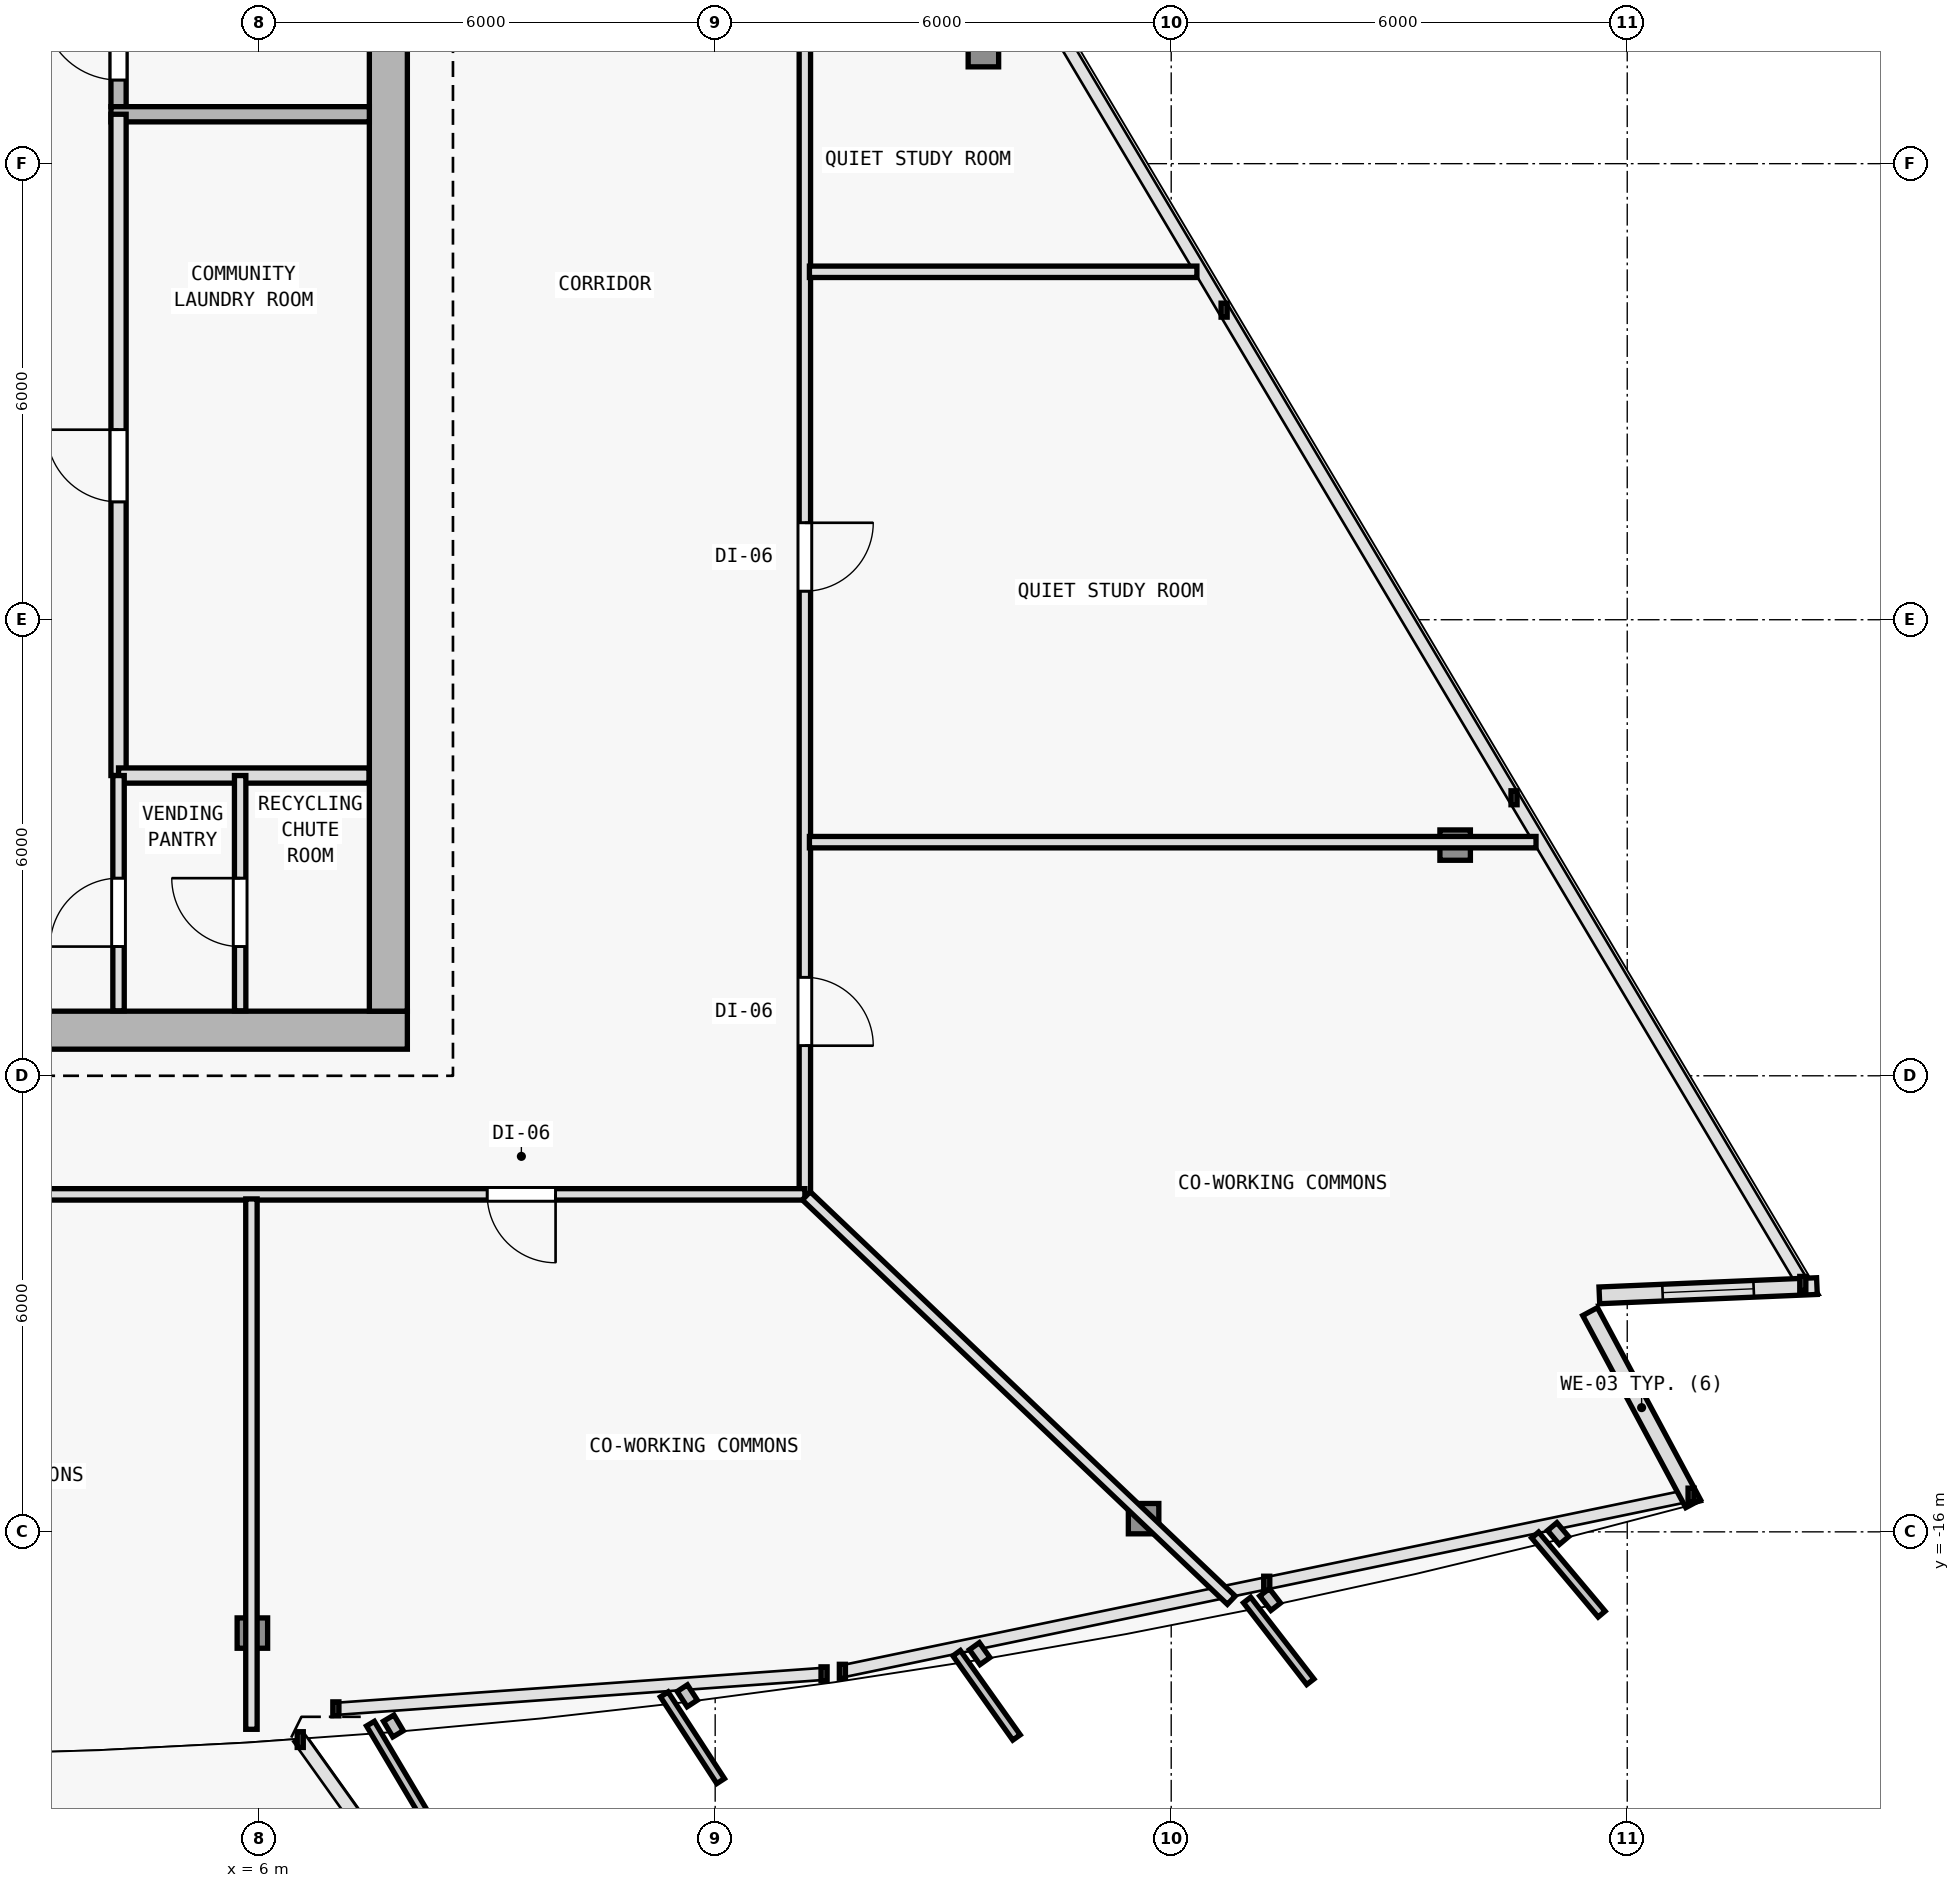
"""IFC4 building model, lengths in metres.
Left out: names, types, materials, properties, quantities, classifications, styles, units other than length and angle.
Written with IfcOpenShell. Run it as: python <this file> out.ifc"""

import sys

from ifc_helpers import new_model, si_unit, direction, frame, frame_2d, origin, origin_2d, place, context, subcontext, project, spatial, rectangle, i_section, extrude, element, fill, save


model = new_model("IFC4")
c1 = context("Model", 3, precision=1e-05, world=origin(), true_north=direction((0.0, 1.0)))
c2 = subcontext(c1, "Body", "Model", "MODEL_VIEW")
j1 = project(units=[si_unit("LENGTHUNIT", "METRE"), si_unit("PLANEANGLEUNIT", "RADIAN")], contexts=[c1])
p1 = place(None, origin())
s1 = spatial("IfcSite", under=j1, at=p1, CompositionType="ELEMENT")
p2 = place(p1, origin())
s2 = spatial("IfcBuilding", under=s1, at=p2, CompositionType="ELEMENT")
p3 = place(p2, frame((0.0, 0.0, 163.8)))
s3 = spatial("IfcBuildingStorey", under=s2, at=p3, CompositionType="ELEMENT", Elevation=163.8)
for number, where, z_axis, x_axis in (
    (1, (7.7, -9.4, 0.0), (0.0, 0.0, 1.0), (1.0, 0.0, 0.0)),
    (2, (7.7, 0.4, 0.0), (0.0, 0.0, 1.0), (1.0, 0.0, 0.0)),
):
    element("IfcColumn", number, at=place(p3, frame(where, z_axis=z_axis, x_axis=x_axis)), inside=s3, PredefinedType="COLUMN", context=c2, shape_type="SweptSolid", body=[
        extrude(i_section(OverallWidth=0.404, OverallDepth=0.407, WebThickness=0.017, FlangeThickness=0.028, FilletRadius=0.015, at=origin_2d()), origin(), (0.0, 0.0, 1.0), 3.6),
    ])
p4 = place(p3, frame((5.911, -17.332, 0.005), z_axis=(-0.00693381708, 0.03528089279, 0.999353381334), x_axis=(-0.981229659911, -0.192842823335, 0.0)))
e3 = element("IfcColumn", 3, at=p4, inside=s3, PredefinedType="COLUMN", context=c2, shape_type="SweptSolid", body=[
    extrude(i_section(OverallWidth=0.401, OverallDepth=0.399, WebThickness=0.016, FlangeThickness=0.025, FilletRadius=0.015, at=origin_2d()), origin(), (0.0, 0.0, 1.0), 3.592),
])
p5 = place(p3, frame((17.637, -15.826, 0.005), z_axis=(-0.020662834962, 0.033509136961, 0.999224792022), x_axis=(-0.851183725565, -0.524867855115, 0.0)))
e4 = element("IfcColumn", 4, at=p5, inside=s3, PredefinedType="COLUMN", context=c2, shape_type="SweptSolid", body=[
    extrude(i_section(OverallWidth=0.401, OverallDepth=0.399, WebThickness=0.016, FlangeThickness=0.025, FilletRadius=0.015, at=origin_2d()), origin(), (0.0, 0.0, 1.0), 3.592),
])
p6 = place(p3, frame((21.736, -6.965, 0.005), z_axis=(-0.026105663043, 0.021618752208, 0.999425396871), x_axis=(-0.637813971185, -0.770190455771, 0.0)))
e5 = element("IfcColumn", 5, at=p6, inside=s3, PredefinedType="COLUMN", context=c2, shape_type="SweptSolid", body=[
    extrude(i_section(OverallWidth=0.401, OverallDepth=0.399, WebThickness=0.016, FlangeThickness=0.025, FilletRadius=0.015, at=origin_2d()), origin(), (0.0, 0.0, 1.0), 3.591),
])
p7 = place(p3, frame((15.529, 3.473, 0.005), z_axis=(-0.018974023902, 0.009521015578, 0.999774642947), x_axis=(-0.44849454954, -0.893785566583, 0.0)))
e6 = element("IfcColumn", 6, at=p7, inside=s3, PredefinedType="COLUMN", context=c2, shape_type="SweptSolid", body=[
    extrude(i_section(OverallWidth=0.401, OverallDepth=0.399, WebThickness=0.016, FlangeThickness=0.025, FilletRadius=0.015, at=origin_2d()), origin(), (0.0, 0.0, 1.0), 3.59),
])
p8 = place(p3, frame((23.511, -13.102, 0.0), z_axis=(0.0, 0.0, 1.0), x_axis=(0.472804807667, -0.881167188362, 0.0)))
e7 = element("IfcWall", 7, at=p8, inside=s3, PredefinedType="SOLIDWALL", context=c2, shape_type="SweptSolid", body=[
    extrude(rectangle(XDim=2.868, YDim=0.22, at=frame_2d((1.434, 0.0))), origin(), (0.0, 0.0, 1.0), 3.35),
])
p9 = place(p3, frame((26.496, -12.767, 0.0), z_axis=(0.0, 0.0, 1.0), x_axis=(-0.999095763679, -0.042516526188, 0.0)))
e8 = element("IfcWall", 8, at=p9, inside=s3, PredefinedType="SOLIDWALL", context=c2, shape_type="SweptSolid", body=[
    extrude(rectangle(XDim=2.865, YDim=0.22, at=frame_2d((1.433, 0.0))), origin(), (0.0, 0.0, 1.0), 3.35),
])
p10 = place(p9, frame((0.833, 0.0, 0.62)))
e9 = element("IfcOpeningElement", 9, at=p10, cuts=e8, PredefinedType="OPENING", context=c2, shape_type="SweptSolid", body=[
    extrude(rectangle(XDim=1.2, YDim=1.8, at=frame_2d((0.6, 0.9))), frame((0.0, 0.12, 0.0), z_axis=(0.0, -1.0, 0.0), x_axis=(1.0, 0.0, 0.0)), (0.0, 0.0, 1.0), 0.24),
])
p11 = place(p3, frame((-7.95, -9.4, 0.0), z_axis=(0.0, 0.0, 1.0), x_axis=(1.0, 0.0, 0.0)))
e10 = element("IfcWall", 10, at=p11, inside=s3, PredefinedType="SHEAR", context=c2, shape_type="SweptSolid", body=[
    extrude(rectangle(XDim=15.9, YDim=0.5, at=frame_2d((7.95, 0.0))), origin(), (0.0, 0.0, 1.0), 3.35),
])
p12 = place(p11, frame((9.6, 0.0, 0.0)))
e11 = element("IfcOpeningElement", 11, at=p12, cuts=e10, PredefinedType="OPENING", context=c2, shape_type="SweptSolid", body=[
    extrude(rectangle(XDim=1.5, YDim=2.2, at=frame_2d((0.75, 1.1))), frame((0.0, 0.26, 0.0), z_axis=(0.0, -1.0, 0.0), x_axis=(1.0, 0.0, 0.0)), (0.0, 0.0, 1.0), 0.52),
])
p13 = place(p3, frame((7.7, 9.95, 0.0), z_axis=(0.0, 0.0, 1.0), x_axis=(0.0, -1.0, 0.0)))
e12 = element("IfcWall", 12, at=p13, inside=s3, PredefinedType="SHEAR", context=c2, shape_type="SweptSolid", body=[
    extrude(rectangle(XDim=19.1, YDim=0.5, at=frame_2d((9.55, 0.0))), origin(), (0.0, 0.0, 1.0), 3.35),
])
p14 = place(p3, frame((4.15, 2.75, 0.0), z_axis=(0.0, 0.0, 1.0), x_axis=(0.0, 1.0, 0.0)))
e13 = element("IfcWall", 13, at=p14, inside=s3, PredefinedType="SOLIDWALL", context=c2, shape_type="SweptSolid", body=[
    extrude(rectangle(XDim=7.2, YDim=0.2, at=frame_2d((3.6, 0.0))), origin(), (0.0, 0.0, 1.0), 3.35),
])
p15 = place(p14, frame((0.35, 0.0, 0.0)))
e14 = element("IfcOpeningElement", 14, at=p15, cuts=e13, PredefinedType="OPENING", context=c2, shape_type="SweptSolid", body=[
    extrude(rectangle(XDim=1.0, YDim=2.15, at=frame_2d((0.5, 1.075))), frame((0.0, 0.11, 0.0), z_axis=(0.0, -1.0, 0.0), x_axis=(1.0, 0.0, 0.0)), (0.0, 0.0, 1.0), 0.22),
])
p16 = place(p3, frame((4.05, 2.65, 0.0), z_axis=(0.0, 0.0, 1.0), x_axis=(1.0, 0.0, 0.0)))
e15 = element("IfcWall", 15, at=p16, inside=s3, PredefinedType="SOLIDWALL", context=c2, shape_type="SweptSolid", body=[
    extrude(rectangle(XDim=3.4, YDim=0.2, at=frame_2d((1.7, 0.0))), origin(), (0.0, 0.0, 1.0), 3.35),
])
p17 = place(p3, frame((4.15, -6.05, 0.0), z_axis=(0.0, 0.0, 1.0), x_axis=(0.0, 1.0, 0.0)))
e16 = element("IfcWall", 16, at=p17, inside=s3, PredefinedType="SOLIDWALL", context=c2, shape_type="SweptSolid", body=[
    extrude(rectangle(XDim=8.7, YDim=0.2, at=frame_2d((4.35, 0.0))), origin(), (0.0, 0.0, 1.0), 3.35),
])
p18 = place(p17, frame((3.6, 0.0, 0.0)))
e17 = element("IfcOpeningElement", 17, at=p18, cuts=e16, PredefinedType="OPENING", context=c2, shape_type="SweptSolid", body=[
    extrude(rectangle(XDim=0.95, YDim=2.1, at=frame_2d((0.475, 1.05))), frame((0.0, 0.11, 0.0), z_axis=(0.0, -1.0, 0.0), x_axis=(1.0, 0.0, 0.0)), (0.0, 0.0, 1.0), 0.22),
])
p19 = place(p3, frame((4.15, -6.05, 0.0), z_axis=(0.0, 0.0, 1.0), x_axis=(1.0, 0.0, 0.0)))
e18 = element("IfcWall", 18, at=p19, inside=s3, PredefinedType="SOLIDWALL", context=c2, shape_type="SweptSolid", body=[
    extrude(rectangle(XDim=3.295, YDim=0.2, at=frame_2d((1.647, 0.0))), origin(), (0.0, 0.0, 1.0), 3.35),
])
p20 = place(p3, frame((4.15, -9.145, 0.0), z_axis=(0.0, 0.0, 1.0), x_axis=(0.0, 1.0, 0.0)))
e19 = element("IfcWall", 19, at=p20, inside=s3, PredefinedType="PARTITIONING", context=c2, shape_type="SweptSolid", body=[
    extrude(rectangle(XDim=3.095, YDim=0.15, at=frame_2d((1.547, 0.0))), origin(), (0.0, 0.0, 1.0), 3.35),
])
p21 = place(p20, frame((0.845, 0.0, 0.0)))
e20 = element("IfcOpeningElement", 20, at=p21, cuts=e19, PredefinedType="OPENING", context=c2, shape_type="SweptSolid", body=[
    extrude(rectangle(XDim=0.9, YDim=2.1, at=frame_2d((0.45, 1.05))), frame((0.0, 0.085, 0.0), z_axis=(0.0, -1.0, 0.0), x_axis=(1.0, 0.0, 0.0)), (0.0, 0.0, 1.0), 0.17),
])
p22 = place(p3, frame((5.75, -9.145, 0.0), z_axis=(0.0, 0.0, 1.0), x_axis=(0.0, 1.0, 0.0)))
e21 = element("IfcWall", 21, at=p22, inside=s3, PredefinedType="PARTITIONING", context=c2, shape_type="SweptSolid", body=[
    extrude(rectangle(XDim=3.095, YDim=0.15, at=frame_2d((1.547, 0.0))), origin(), (0.0, 0.0, 1.0), 3.35),
])
p23 = place(p22, frame((0.845, 0.0, 0.0)))
e22 = element("IfcOpeningElement", 22, at=p23, cuts=e21, PredefinedType="OPENING", context=c2, shape_type="SweptSolid", body=[
    extrude(rectangle(XDim=0.9, YDim=2.1, at=frame_2d((0.45, 1.05))), frame((0.0, 0.085, 0.0), z_axis=(0.0, -1.0, 0.0), x_axis=(1.0, 0.0, 0.0)), (0.0, 0.0, 1.0), 0.17),
])
p24 = place(p3, frame((13.18, 8.444, 0.0), z_axis=(0.0, 0.0, 1.0), x_axis=(0.0, -1.0, 0.0)))
e23 = element("IfcWall", 23, at=p24, inside=s3, PredefinedType="PARTITIONING", context=c2, shape_type="SweptSolid", body=[
    extrude(rectangle(XDim=20.004, YDim=0.15, at=frame_2d((10.002, 0.0))), origin(), (0.0, 0.0, 1.0), 2.825),
])
p25 = place(p24, frame((17.148, 0.0, 0.0)))
e24 = element("IfcOpeningElement", 24, at=p25, cuts=e23, PredefinedType="OPENING", context=c2, shape_type="SweptSolid", body=[
    extrude(rectangle(XDim=0.9, YDim=2.1, at=frame_2d((0.45, 1.05))), frame((0.0, 0.085, 0.0), z_axis=(0.0, -1.0, 0.0), x_axis=(1.0, 0.0, 0.0)), (0.0, 0.0, 1.0), 0.17),
])
p26 = place(p24, frame((11.168, 0.0, 0.0)))
e25 = element("IfcOpeningElement", 25, at=p26, cuts=e23, PredefinedType="OPENING", context=c2, shape_type="SweptSolid", body=[
    extrude(rectangle(XDim=0.9, YDim=2.1, at=frame_2d((0.45, 1.05))), frame((0.0, 0.085, 0.0), z_axis=(0.0, -1.0, 0.0), x_axis=(1.0, 0.0, 0.0)), (0.0, 0.0, 1.0), 0.17),
])
p27 = place(p24, frame((3.573, 0.0, 0.0)))
e26 = element("IfcOpeningElement", 26, at=p27, cuts=e23, PredefinedType="OPENING", context=c2, shape_type="SweptSolid", body=[
    extrude(rectangle(XDim=0.9, YDim=2.1, at=frame_2d((0.45, 1.05))), frame((0.0, 0.085, 0.0), z_axis=(0.0, -1.0, 0.0), x_axis=(1.0, 0.0, 0.0)), (0.0, 0.0, 1.0), 0.17),
])
p28 = place(p3, frame((13.18, -11.56, 0.0), z_axis=(0.0, 0.0, 1.0), x_axis=(-1.0, 0.0, 0.0)))
e27 = element("IfcWall", 27, at=p28, inside=s3, PredefinedType="PARTITIONING", context=c2, shape_type="SweptSolid", body=[
    extrude(rectangle(XDim=23.04, YDim=0.15, at=frame_2d((11.52, 0.0))), origin(), (0.0, 0.0, 1.0), 2.725),
])
p29 = place(p28, frame((12.73, 0.0, 0.0)))
e28 = element("IfcOpeningElement", 28, at=p29, cuts=e27, PredefinedType="OPENING", context=c2, shape_type="SweptSolid", body=[
    extrude(rectangle(XDim=0.9, YDim=2.1, at=frame_2d((0.45, 1.05))), frame((0.0, 0.085, 0.0), z_axis=(0.0, -1.0, 0.0), x_axis=(1.0, 0.0, 0.0)), (0.0, 0.0, 1.0), 0.17),
])
p30 = place(p28, frame((3.28, 0.0, 0.0)))
e29 = element("IfcOpeningElement", 29, at=p30, cuts=e27, PredefinedType="OPENING", context=c2, shape_type="SweptSolid", body=[
    extrude(rectangle(XDim=0.9, YDim=2.1, at=frame_2d((0.45, 1.05))), frame((0.0, 0.085, 0.0), z_axis=(0.0, -1.0, 0.0), x_axis=(1.0, 0.0, 0.0)), (0.0, 0.0, 1.0), 0.17),
])
p31 = place(p3, frame((5.898, -11.62, 0.0), z_axis=(0.0, 0.0, 1.0), x_axis=(0.0, -1.0, 0.0)))
e30 = element("IfcWall", 30, at=p31, inside=s3, PredefinedType="PARTITIONING", context=c2, shape_type="SweptSolid", body=[
    extrude(rectangle(XDim=6.978, YDim=0.15, at=frame_2d((3.489, 0.0))), origin(), (0.0, 0.0, 1.0), 2.825),
])
p32 = place(p3, frame((13.199, -11.579, 0.0), z_axis=(0.0, 0.0, 1.0), x_axis=(0.724459810476, -0.689317040994, 0.0)))
e31 = element("IfcWall", 31, at=p32, inside=s3, PredefinedType="PARTITIONING", context=c2, shape_type="SweptSolid", body=[
    extrude(rectangle(XDim=7.718, YDim=0.15, at=frame_2d((3.859, 0.0))), origin(), (0.0, 0.0, 1.0), 2.825),
])
p33 = place(p3, frame((13.24, -6.926, 0.0), z_axis=(0.0, 0.0, 1.0), x_axis=(1.0, 0.0, 0.0)))
e32 = element("IfcWall", 32, at=p33, inside=s3, PredefinedType="PARTITIONING", context=c2, shape_type="SweptSolid", body=[
    extrude(rectangle(XDim=9.56, YDim=0.15, at=frame_2d((4.78, 0.0))), origin(), (0.0, 0.0, 1.0), 2.825),
])
p34 = place(p3, frame((13.24, 0.577, 0.0), z_axis=(0.0, 0.0, 1.0), x_axis=(1.0, 0.0, 0.0)))
e33 = element("IfcWall", 33, at=p34, inside=s3, PredefinedType="PARTITIONING", context=c2, shape_type="SweptSolid", body=[
    extrude(rectangle(XDim=5.098, YDim=0.15, at=frame_2d((2.549, 0.0))), origin(), (0.0, 0.0, 1.0), 2.925),
])
p35 = place(p10, origin())
e34 = element("IfcWindow", 34, at=p35, inside=s3, PartitioningType="SINGLE_PANEL", PredefinedType="WINDOW", context=c2, shape_type="SweptSolid", body=[
    extrude(rectangle(XDim=1.2, YDim=1.8, at=frame_2d((0.6, 0.9))), frame((0.0, 0.03, 0.0), z_axis=(0.0, -1.0, 0.0), x_axis=(1.0, 0.0, 0.0)), (0.0, 0.0, 1.0), 0.06),
])
fill(e9, e34)
p36 = place(p15, origin())
e35 = element("IfcDoor", 35, at=p36, inside=s3, OperationType="SINGLE_SWING_RIGHT", PredefinedType="DOOR", context=c2, shape_type="SweptSolid", body=[
    extrude(rectangle(XDim=1.0, YDim=2.15, at=frame_2d((0.5, 1.075))), frame((0.0, 0.025, 0.0), z_axis=(0.0, -1.0, 0.0), x_axis=(1.0, 0.0, 0.0)), (0.0, 0.0, 1.0), 0.05),
])
fill(e14, e35)
p37 = place(p18, origin())
e36 = element("IfcDoor", 36, at=p37, inside=s3, OperationType="SINGLE_SWING_RIGHT", PredefinedType="DOOR", context=c2, shape_type="SweptSolid", body=[
    extrude(rectangle(XDim=0.95, YDim=2.1, at=frame_2d((0.475, 1.05))), frame((0.0, 0.025, 0.0), z_axis=(0.0, -1.0, 0.0), x_axis=(1.0, 0.0, 0.0)), (0.0, 0.0, 1.0), 0.05),
])
fill(e17, e36)
p38 = place(p21, origin())
e37 = element("IfcDoor", 37, at=p38, inside=s3, OperationType="SINGLE_SWING_LEFT", PredefinedType="DOOR", context=c2, shape_type="SweptSolid", body=[
    extrude(rectangle(XDim=0.9, YDim=2.1, at=frame_2d((0.45, 1.05))), frame((0.0, 0.025, 0.0), z_axis=(0.0, -1.0, 0.0), x_axis=(1.0, 0.0, 0.0)), (0.0, 0.0, 1.0), 0.05),
])
fill(e20, e37)
p39 = place(p23, origin())
e38 = element("IfcDoor", 38, at=p39, inside=s3, OperationType="SINGLE_SWING_RIGHT", PredefinedType="DOOR", context=c2, shape_type="SweptSolid", body=[
    extrude(rectangle(XDim=0.9, YDim=2.1, at=frame_2d((0.45, 1.05))), frame((0.0, 0.025, 0.0), z_axis=(0.0, -1.0, 0.0), x_axis=(1.0, 0.0, 0.0)), (0.0, 0.0, 1.0), 0.05),
])
fill(e22, e38)
p40 = place(p30, origin())
e39 = element("IfcDoor", 39, at=p40, inside=s3, OperationType="SINGLE_SWING_LEFT", PredefinedType="DOOR", context=c2, shape_type="SweptSolid", body=[
    extrude(rectangle(XDim=0.9, YDim=2.1, at=frame_2d((0.45, 1.05))), frame((0.0, 0.025, 0.0), z_axis=(0.0, -1.0, 0.0), x_axis=(1.0, 0.0, 0.0)), (0.0, 0.0, 1.0), 0.05),
])
fill(e29, e39)
p41 = place(p25, origin())
e40 = element("IfcDoor", 40, at=p41, inside=s3, OperationType="SINGLE_SWING_RIGHT", PredefinedType="DOOR", context=c2, shape_type="SweptSolid", body=[
    extrude(rectangle(XDim=0.9, YDim=2.1, at=frame_2d((0.45, 1.05))), frame((0.0, 0.025, 0.0), z_axis=(0.0, -1.0, 0.0), x_axis=(1.0, 0.0, 0.0)), (0.0, 0.0, 1.0), 0.05),
])
fill(e24, e40)
p42 = place(p26, origin())
e41 = element("IfcDoor", 41, at=p42, inside=s3, OperationType="SINGLE_SWING_LEFT", PredefinedType="DOOR", context=c2, shape_type="SweptSolid", body=[
    extrude(rectangle(XDim=0.9, YDim=2.1, at=frame_2d((0.45, 1.05))), frame((0.0, 0.025, 0.0), z_axis=(0.0, -1.0, 0.0), x_axis=(1.0, 0.0, 0.0)), (0.0, 0.0, 1.0), 0.05),
])
fill(e25, e41)
save(model, sys.argv[1])
